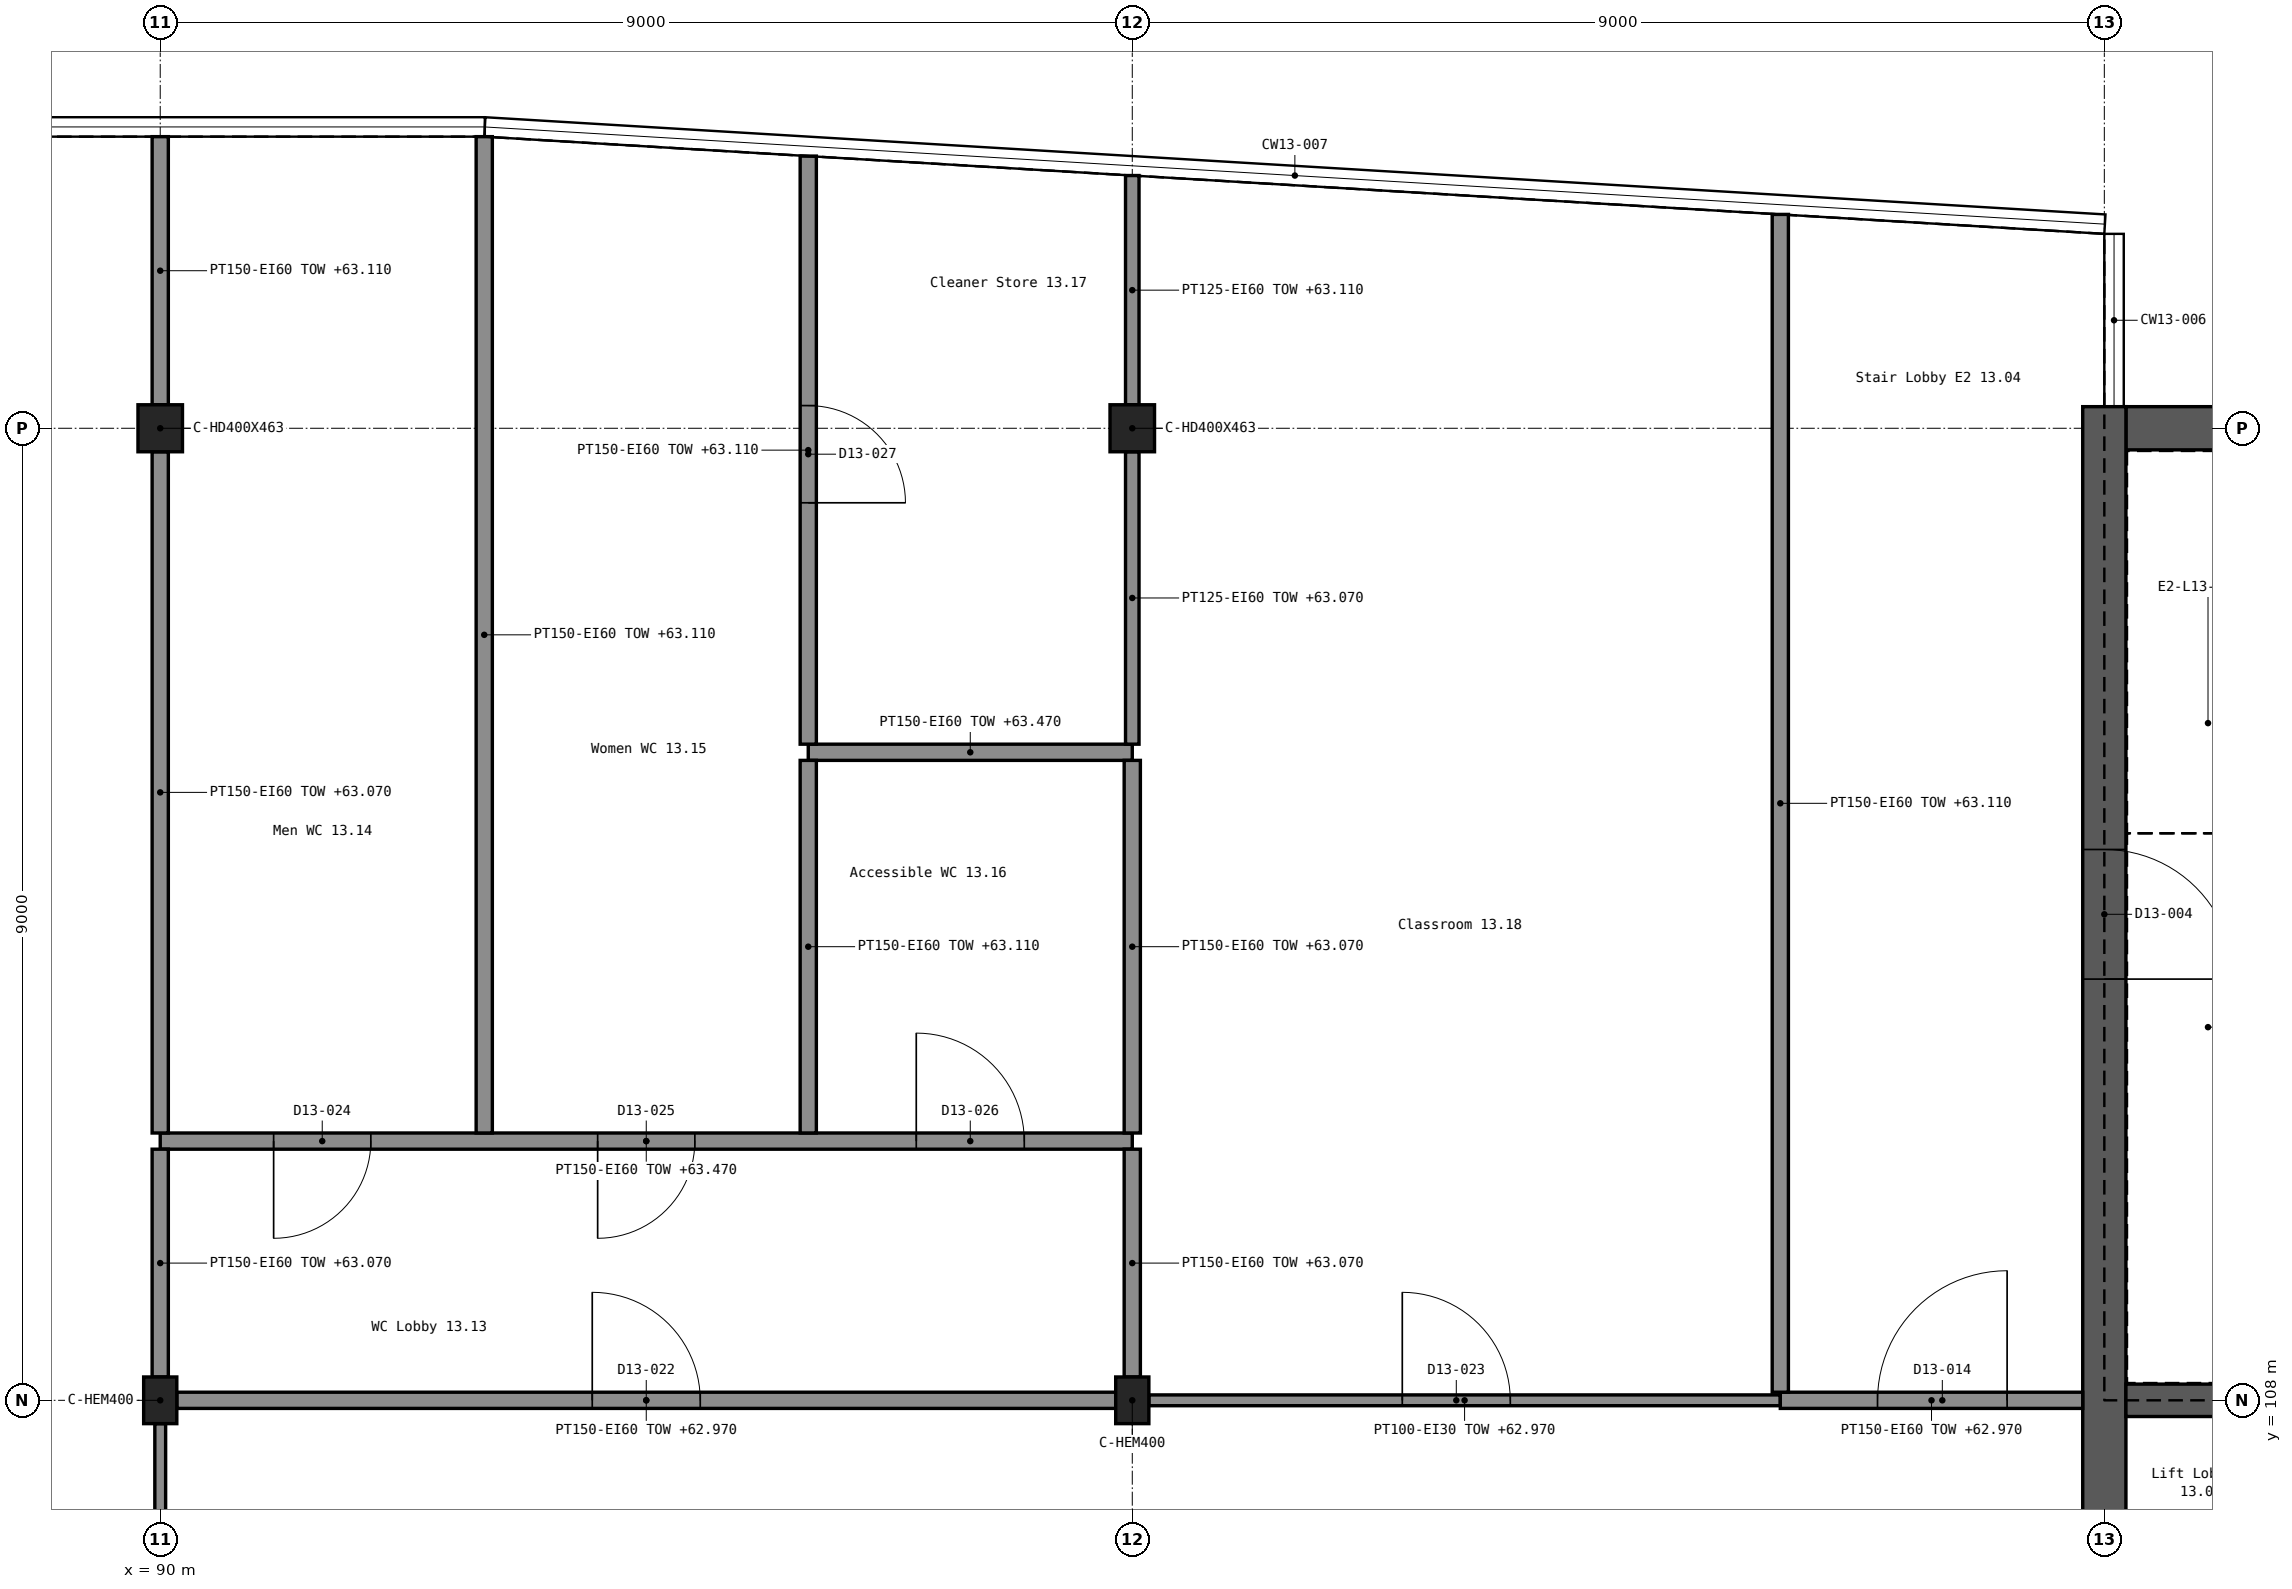
"""IFC4 building model, lengths in metres.
Left out: names, types, materials, properties, quantities, classifications, styles, units other than length and angle.
Written with IfcOpenShell. Run it as: python <this file> out.ifc"""

import sys

from ifc_helpers import new_model, si_unit, direction, frame, frame_2d, origin, origin_2d, place, context, subcontext, project, spatial, rectangle, i_section, extrude, element, fill, save


model = new_model("IFC4")
c1 = context("Model", 3, precision=1e-05, world=origin(), true_north=direction((0.0, 1.0)))
c2 = subcontext(c1, "Body", "Model", "MODEL_VIEW")
j1 = project(units=[si_unit("LENGTHUNIT", "METRE"), si_unit("PLANEANGLEUNIT", "RADIAN")], contexts=[c1])
p1 = place(None, origin())
s1 = spatial("IfcSite", under=j1, at=p1, CompositionType="ELEMENT")
p2 = place(p1, origin())
s2 = spatial("IfcBuilding", under=s1, at=p2, CompositionType="ELEMENT")
p3 = place(p2, frame((0.0, 0.0, 59.7)))
s3 = spatial("IfcBuildingStorey", under=s2, at=p3, CompositionType="ELEMENT", Elevation=59.7)
p4 = place(p3, frame((108.2, 117.0, 0.0), z_axis=(0.0, 0.0, 1.0), x_axis=(1.0, 0.0, 0.0)))
e1 = element("IfcWall", 1, at=p4, inside=s3, PredefinedType="SHEAR", context=c2, shape_type="SweptSolid", body=[
    extrude(rectangle(XDim=8.6, YDim=0.4, at=frame_2d((4.3, 0.0))), origin(), (0.0, 0.0, 1.0), 3.9),
])
p5 = place(p4, frame((4.05, 0.0, 1.2)))
e2 = element("IfcOpeningElement", 2, at=p5, cuts=e1, PredefinedType="OPENING", context=c2, shape_type="SweptSolid", body=[
    extrude(rectangle(XDim=0.9, YDim=1.5, at=frame_2d((0.45, 0.75))), frame((0.0, 0.211, 0.0), z_axis=(0.0, -1.0, 0.0), x_axis=(1.0, 0.0, 0.0)), (0.0, 0.0, 1.0), 0.422),
])
p6 = place(p3, frame((108.0, 89.8, 0.0), z_axis=(0.0, 0.0, 1.0), x_axis=(0.0, 1.0, 0.0)))
e3 = element("IfcWall", 3, at=p6, inside=s3, PredefinedType="SHEAR", context=c2, shape_type="SweptSolid", body=[
    extrude(rectangle(XDim=27.4, YDim=0.4, at=frame_2d((13.7, 0.0))), origin(), (0.0, 0.0, 1.0), 3.9),
])
p7 = place(p6, frame((4.1, 0.0, 0.0)))
e4 = element("IfcOpeningElement", 4, at=p7, cuts=e3, PredefinedType="OPENING", context=c2, shape_type="SweptSolid", body=[
    extrude(rectangle(XDim=1.2, YDim=2.1, at=frame_2d((0.6, 1.05))), frame((0.0, 0.211, 0.0), z_axis=(0.0, -1.0, 0.0), x_axis=(1.0, 0.0, 0.0)), (0.0, 0.0, 1.0), 0.422),
])
p8 = place(p6, frame((22.1, 0.0, 0.0)))
e5 = element("IfcOpeningElement", 5, at=p8, cuts=e3, PredefinedType="OPENING", context=c2, shape_type="SweptSolid", body=[
    extrude(rectangle(XDim=1.2, YDim=2.1, at=frame_2d((0.6, 1.05))), frame((0.0, 0.211, 0.0), z_axis=(0.0, -1.0, 0.0), x_axis=(1.0, 0.0, 0.0)), (0.0, 0.0, 1.0), 0.422),
])
p9 = place(p6, frame((12.5, 0.0, 0.0)))
e6 = element("IfcOpeningElement", 6, at=p9, cuts=e3, PredefinedType="OPENING", context=c2, shape_type="SweptSolid", body=[
    extrude(rectangle(XDim=2.0, YDim=2.1, at=frame_2d((1.0, 1.05))), frame((0.0, 0.211, 0.0), z_axis=(0.0, -1.0, 0.0), x_axis=(1.0, 0.0, 0.0)), (0.0, 0.0, 1.0), 0.422),
])
p10 = place(p3, frame((108.2, 108.0, 0.0), z_axis=(0.0, 0.0, 1.0), x_axis=(1.0, 0.0, 0.0)))
e7 = element("IfcWall", 7, at=p10, inside=s3, PredefinedType="SHEAR", context=c2, shape_type="SweptSolid", body=[
    extrude(rectangle(XDim=8.6, YDim=0.3, at=frame_2d((4.3, 0.0))), origin(), (0.0, 0.0, 1.0), 3.9),
])
for number, where, z_axis, x_axis in (
    (8, (90.0, 108.0, 0.0), (0.0, 0.0, 1.0), (1.0, 0.0, 0.0)),
    (9, (99.0, 108.0, 0.0), (0.0, 0.0, 1.0), (1.0, 0.0, 0.0)),
):
    element("IfcColumn", number, at=place(p3, frame(where, z_axis=z_axis, x_axis=x_axis)), inside=s3, PredefinedType="COLUMN", context=c2, shape_type="SweptSolid", body=[
        extrude(i_section(OverallWidth=0.307, OverallDepth=0.432, WebThickness=0.021, FlangeThickness=0.04, FilletRadius=0.027, at=origin_2d()), origin(), (0.0, 0.0, 1.0), 3.9),
    ])
for number, where, z_axis, x_axis in (
    (10, (90.0, 117.0, 0.0), (0.0, 0.0, 1.0), (1.0, 0.0, 0.0)),
    (11, (99.0, 117.0, 0.0), (0.0, 0.0, 1.0), (1.0, 0.0, 0.0)),
):
    element("IfcColumn", number, at=place(p3, frame(where, z_axis=z_axis, x_axis=x_axis)), inside=s3, PredefinedType="COLUMN", context=c2, shape_type="SweptSolid", body=[
        extrude(i_section(OverallWidth=0.412, OverallDepth=0.435, WebThickness=0.036, FlangeThickness=0.057, FilletRadius=0.015, at=origin_2d()), origin(), (0.0, 0.0, 1.0), 3.9),
    ])
p11 = place(p3, frame((99.154, 108.0, 0.0), z_axis=(0.0, 0.0, 1.0), x_axis=(1.0, 0.0, 0.0)))
e12 = element("IfcWall", 12, at=p11, inside=s3, PredefinedType="PARTITIONING", context=c2, shape_type="SweptSolid", body=[
    extrude(rectangle(XDim=5.846, YDim=0.1, at=frame_2d((2.923, 0.0))), origin(), (0.0, 0.0, 1.0), 3.27),
])
p12 = place(p11, frame((2.346, 0.0, 0.0)))
e13 = element("IfcOpeningElement", 13, at=p12, cuts=e12, PredefinedType="OPENING", context=c2, shape_type="SweptSolid", body=[
    extrude(rectangle(XDim=1.0, YDim=2.1, at=frame_2d((0.5, 1.05))), frame((0.0, 0.061, 0.0), z_axis=(0.0, -1.0, 0.0), x_axis=(1.0, 0.0, 0.0)), (0.0, 0.0, 1.0), 0.122),
])
p13 = place(p3, frame((90.154, 108.0, 0.0), z_axis=(0.0, 0.0, 1.0), x_axis=(1.0, 0.0, 0.0)))
e14 = element("IfcWall", 14, at=p13, inside=s3, PredefinedType="PARTITIONING", context=c2, shape_type="SweptSolid", body=[
    extrude(rectangle(XDim=8.693, YDim=0.15, at=frame_2d((4.346, 0.0))), origin(), (0.0, 0.0, 1.0), 3.27),
])
p14 = place(p13, frame((3.846, 0.0, 0.0)))
e15 = element("IfcOpeningElement", 15, at=p14, cuts=e14, PredefinedType="OPENING", context=c2, shape_type="SweptSolid", body=[
    extrude(rectangle(XDim=1.0, YDim=2.1, at=frame_2d((0.5, 1.05))), frame((0.0, 0.086, 0.0), z_axis=(0.0, -1.0, 0.0), x_axis=(1.0, 0.0, 0.0)), (0.0, 0.0, 1.0), 0.172),
])
p15 = place(p3, frame((105.0, 108.0, 0.0), z_axis=(0.0, 0.0, 1.0), x_axis=(1.0, 0.0, 0.0)))
e16 = element("IfcWall", 16, at=p15, inside=s3, PredefinedType="PARTITIONING", context=c2, shape_type="SweptSolid", body=[
    extrude(rectangle(XDim=2.8, YDim=0.15, at=frame_2d((1.4, 0.0))), origin(), (0.0, 0.0, 1.0), 3.27),
])
p16 = place(p15, frame((0.9, 0.0, 0.0)))
e17 = element("IfcOpeningElement", 17, at=p16, cuts=e16, PredefinedType="OPENING", context=c2, shape_type="SweptSolid", body=[
    extrude(rectangle(XDim=1.2, YDim=2.1, at=frame_2d((0.6, 1.05))), frame((0.0, 0.086, 0.0), z_axis=(0.0, -1.0, 0.0), x_axis=(1.0, 0.0, 0.0)), (0.0, 0.0, 1.0), 0.172),
])
p17 = place(p3, frame((90.0, 110.4, 0.0), z_axis=(0.0, 0.0, 1.0), x_axis=(1.0, 0.0, 0.0)))
e18 = element("IfcWall", 18, at=p17, inside=s3, PredefinedType="PARTITIONING", context=c2, shape_type="SweptSolid", body=[
    extrude(rectangle(XDim=9.0, YDim=0.15, at=frame_2d((4.5, 0.0))), origin(), (0.0, 0.0, 1.0), 3.77),
])
p18 = place(p17, frame((1.05, 0.0, 0.0)))
e19 = element("IfcOpeningElement", 19, at=p18, cuts=e18, PredefinedType="OPENING", context=c2, shape_type="SweptSolid", body=[
    extrude(rectangle(XDim=0.9, YDim=2.1, at=frame_2d((0.45, 1.05))), frame((0.0, 0.086, 0.0), z_axis=(0.0, -1.0, 0.0), x_axis=(1.0, 0.0, 0.0)), (0.0, 0.0, 1.0), 0.172),
])
p19 = place(p17, frame((4.05, 0.0, 0.0)))
e20 = element("IfcOpeningElement", 20, at=p19, cuts=e18, PredefinedType="OPENING", context=c2, shape_type="SweptSolid", body=[
    extrude(rectangle(XDim=0.9, YDim=2.1, at=frame_2d((0.45, 1.05))), frame((0.0, 0.086, 0.0), z_axis=(0.0, -1.0, 0.0), x_axis=(1.0, 0.0, 0.0)), (0.0, 0.0, 1.0), 0.172),
])
p20 = place(p17, frame((7.0, 0.0, 0.0)))
e21 = element("IfcOpeningElement", 21, at=p20, cuts=e18, PredefinedType="OPENING", context=c2, shape_type="SweptSolid", body=[
    extrude(rectangle(XDim=1.0, YDim=2.1, at=frame_2d((0.5, 1.05))), frame((0.0, 0.086, 0.0), z_axis=(0.0, -1.0, 0.0), x_axis=(1.0, 0.0, 0.0)), (0.0, 0.0, 1.0), 0.172),
])
p21 = place(p3, frame((96.0, 114.0, 0.0), z_axis=(0.0, 0.0, 1.0), x_axis=(1.0, 0.0, 0.0)))
e22 = element("IfcWall", 22, at=p21, inside=s3, PredefinedType="PARTITIONING", context=c2, shape_type="SweptSolid", body=[
    extrude(rectangle(XDim=3.0, YDim=0.15, at=frame_2d((1.5, 0.0))), origin(), (0.0, 0.0, 1.0), 3.77),
])
p22 = place(p3, frame((90.0, 99.216, 0.0), z_axis=(0.0, 0.0, 1.0), x_axis=(0.0, 1.0, 0.0)))
e23 = element("IfcWall", 23, at=p22, inside=s3, PredefinedType="PARTITIONING", context=c2, shape_type="SweptSolid", body=[
    extrude(rectangle(XDim=8.568, YDim=0.1, at=frame_2d((4.284, 0.0))), origin(), (0.0, 0.0, 1.0), 3.37),
])
p23 = place(p22, frame((5.759, 0.0, 0.0)))
e24 = element("IfcOpeningElement", 24, at=p23, cuts=e23, PredefinedType="OPENING", context=c2, shape_type="SweptSolid", body=[
    extrude(rectangle(XDim=1.8, YDim=2.4, at=frame_2d((0.9, 1.2))), frame((0.0, 0.061, 0.0), z_axis=(0.0, -1.0, 0.0), x_axis=(1.0, 0.0, 0.0)), (0.0, 0.0, 1.0), 0.122),
])
p24 = place(p3, frame((90.0, 108.216, 0.0), z_axis=(0.0, 0.0, 1.0), x_axis=(0.0, 1.0, 0.0)))
e25 = element("IfcWall", 25, at=p24, inside=s3, PredefinedType="PARTITIONING", context=c2, shape_type="SweptSolid", body=[
    extrude(rectangle(XDim=2.109, YDim=0.15, at=frame_2d((1.054, 0.0))), origin(), (0.0, 0.0, 1.0), 3.37),
])
p25 = place(p3, frame((90.0, 110.475, 0.0), z_axis=(0.0, 0.0, 1.0), x_axis=(0.0, 1.0, 0.0)))
e26 = element("IfcWall", 26, at=p25, inside=s3, PredefinedType="PARTITIONING", context=c2, shape_type="SweptSolid", body=[
    extrude(rectangle(XDim=6.307, YDim=0.15, at=frame_2d((3.154, 0.0))), origin(), (0.0, 0.0, 1.0), 3.37),
])
p26 = place(p3, frame((90.0, 117.218, 0.0), z_axis=(0.0, 0.0, 1.0), x_axis=(0.0, 1.0, 0.0)))
e27 = element("IfcWall", 27, at=p26, inside=s3, PredefinedType="PARTITIONING", context=c2, shape_type="SweptSolid", body=[
    extrude(rectangle(XDim=2.482, YDim=0.15, at=frame_2d((1.241, 0.0))), origin(), (0.0, 0.0, 1.0), 3.41),
])
p27 = place(p3, frame((93.0, 110.475, 0.0), z_axis=(0.0, 0.0, 1.0), x_axis=(0.0, 1.0, 0.0)))
e28 = element("IfcWall", 28, at=p27, inside=s3, PredefinedType="PARTITIONING", context=c2, shape_type="SweptSolid", body=[
    extrude(rectangle(XDim=9.225, YDim=0.15, at=frame_2d((4.612, 0.0))), origin(), (0.0, 0.0, 1.0), 3.41),
])
p28 = place(p3, frame((96.0, 110.475, 0.0), z_axis=(0.0, 0.0, 1.0), x_axis=(0.0, 1.0, 0.0)))
e29 = element("IfcWall", 29, at=p28, inside=s3, PredefinedType="PARTITIONING", context=c2, shape_type="SweptSolid", body=[
    extrude(rectangle(XDim=3.45, YDim=0.15, at=frame_2d((1.725, 0.0))), origin(), (0.0, 0.0, 1.0), 3.41),
])
p29 = place(p3, frame((96.0, 114.075, 0.0), z_axis=(0.0, 0.0, 1.0), x_axis=(0.0, 1.0, 0.0)))
e30 = element("IfcWall", 30, at=p29, inside=s3, PredefinedType="PARTITIONING", context=c2, shape_type="SweptSolid", body=[
    extrude(rectangle(XDim=5.445, YDim=0.15, at=frame_2d((2.723, 0.0))), origin(), (0.0, 0.0, 1.0), 3.41),
])
p30 = place(p29, frame((2.235, 0.0, 0.0)))
e31 = element("IfcOpeningElement", 31, at=p30, cuts=e30, PredefinedType="OPENING", context=c2, shape_type="SweptSolid", body=[
    extrude(rectangle(XDim=0.9, YDim=2.1, at=frame_2d((0.45, 1.05))), frame((0.0, 0.086, 0.0), z_axis=(0.0, -1.0, 0.0), x_axis=(1.0, 0.0, 0.0)), (0.0, 0.0, 1.0), 0.172),
])
p31 = place(p3, frame((99.0, 114.075, 0.0), z_axis=(0.0, 0.0, 1.0), x_axis=(0.0, 1.0, 0.0)))
e32 = element("IfcWall", 32, at=p31, inside=s3, PredefinedType="PARTITIONING", context=c2, shape_type="SweptSolid", body=[
    extrude(rectangle(XDim=2.708, YDim=0.125, at=frame_2d((1.354, 0.0))), origin(), (0.0, 0.0, 1.0), 3.37),
])
p32 = place(p3, frame((99.0, 117.218, 0.0), z_axis=(0.0, 0.0, 1.0), x_axis=(0.0, 1.0, 0.0)))
e33 = element("IfcWall", 33, at=p32, inside=s3, PredefinedType="PARTITIONING", context=c2, shape_type="SweptSolid", body=[
    extrude(rectangle(XDim=2.123, YDim=0.125, at=frame_2d((1.061, 0.0))), origin(), (0.0, 0.0, 1.0), 3.41),
])
p33 = place(p3, frame((99.0, 108.216, 0.0), z_axis=(0.0, 0.0, 1.0), x_axis=(0.0, 1.0, 0.0)))
e34 = element("IfcWall", 34, at=p33, inside=s3, PredefinedType="PARTITIONING", context=c2, shape_type="SweptSolid", body=[
    extrude(rectangle(XDim=2.109, YDim=0.15, at=frame_2d((1.054, 0.0))), origin(), (0.0, 0.0, 1.0), 3.37),
])
p34 = place(p3, frame((99.0, 110.475, 0.0), z_axis=(0.0, 0.0, 1.0), x_axis=(0.0, 1.0, 0.0)))
e35 = element("IfcWall", 35, at=p34, inside=s3, PredefinedType="PARTITIONING", context=c2, shape_type="SweptSolid", body=[
    extrude(rectangle(XDim=3.45, YDim=0.15, at=frame_2d((1.725, 0.0))), origin(), (0.0, 0.0, 1.0), 3.37),
])
p35 = place(p3, frame((105.0, 108.075, 0.0), z_axis=(0.0, 0.0, 1.0), x_axis=(0.0, 1.0, 0.0)))
e36 = element("IfcWall", 36, at=p35, inside=s3, PredefinedType="PARTITIONING", context=c2, shape_type="SweptSolid", body=[
    extrude(rectangle(XDim=10.905, YDim=0.15, at=frame_2d((5.453, 0.0))), origin(), (0.0, 0.0, 1.0), 3.41),
])
p36 = place(p8, frame((1.2, 0.0, 0.0), z_axis=(0.0, 0.0, 1.0), x_axis=(-1.0, 0.0, 0.0)))
e37 = element("IfcDoor", 37, at=p36, inside=s3, OperationType="SINGLE_SWING_RIGHT", PredefinedType="DOOR", context=c2, shape_type="SweptSolid", body=[
    extrude(rectangle(XDim=1.2, YDim=2.1, at=frame_2d((0.6, 1.05))), frame((0.0, 0.025, 0.0), z_axis=(0.0, -1.0, 0.0), x_axis=(1.0, 0.0, 0.0)), (0.0, 0.0, 1.0), 0.05),
])
fill(e5, e37)
p37 = place(p16, origin())
e38 = element("IfcDoor", 38, at=p37, inside=s3, OperationType="SINGLE_SWING_RIGHT", PredefinedType="DOOR", context=c2, shape_type="SweptSolid", body=[
    extrude(rectangle(XDim=1.2, YDim=2.1, at=frame_2d((0.6, 1.05))), frame((0.0, 0.025, 0.0), z_axis=(0.0, -1.0, 0.0), x_axis=(1.0, 0.0, 0.0)), (0.0, 0.0, 1.0), 0.05),
])
fill(e17, e38)
p38 = place(p14, origin())
e39 = element("IfcDoor", 39, at=p38, inside=s3, OperationType="SINGLE_SWING_LEFT", PredefinedType="DOOR", context=c2, shape_type="SweptSolid", body=[
    extrude(rectangle(XDim=1.0, YDim=2.1, at=frame_2d((0.5, 1.05))), frame((0.0, 0.025, 0.0), z_axis=(0.0, -1.0, 0.0), x_axis=(1.0, 0.0, 0.0)), (0.0, 0.0, 1.0), 0.05),
])
fill(e15, e39)
p39 = place(p12, origin())
e40 = element("IfcDoor", 40, at=p39, inside=s3, OperationType="SINGLE_SWING_LEFT", PredefinedType="DOOR", context=c2, shape_type="SweptSolid", body=[
    extrude(rectangle(XDim=1.0, YDim=2.1, at=frame_2d((0.5, 1.05))), frame((0.0, 0.025, 0.0), z_axis=(0.0, -1.0, 0.0), x_axis=(1.0, 0.0, 0.0)), (0.0, 0.0, 1.0), 0.05),
])
fill(e13, e40)
p40 = place(p18, frame((0.9, 0.0, 0.0), z_axis=(0.0, 0.0, 1.0), x_axis=(-1.0, 0.0, 0.0)))
e41 = element("IfcDoor", 41, at=p40, inside=s3, OperationType="SINGLE_SWING_RIGHT", PredefinedType="DOOR", context=c2, shape_type="SweptSolid", body=[
    extrude(rectangle(XDim=0.9, YDim=2.1, at=frame_2d((0.45, 1.05))), frame((0.0, 0.025, 0.0), z_axis=(0.0, -1.0, 0.0), x_axis=(1.0, 0.0, 0.0)), (0.0, 0.0, 1.0), 0.05),
])
fill(e19, e41)
p41 = place(p19, frame((0.9, 0.0, 0.0), z_axis=(0.0, 0.0, 1.0), x_axis=(-1.0, 0.0, 0.0)))
e42 = element("IfcDoor", 42, at=p41, inside=s3, OperationType="SINGLE_SWING_RIGHT", PredefinedType="DOOR", context=c2, shape_type="SweptSolid", body=[
    extrude(rectangle(XDim=0.9, YDim=2.1, at=frame_2d((0.45, 1.05))), frame((0.0, 0.025, 0.0), z_axis=(0.0, -1.0, 0.0), x_axis=(1.0, 0.0, 0.0)), (0.0, 0.0, 1.0), 0.05),
])
fill(e20, e42)
p42 = place(p20, origin())
e43 = element("IfcDoor", 43, at=p42, inside=s3, OperationType="SINGLE_SWING_LEFT", PredefinedType="DOOR", context=c2, shape_type="SweptSolid", body=[
    extrude(rectangle(XDim=1.0, YDim=2.1, at=frame_2d((0.5, 1.05))), frame((0.0, 0.025, 0.0), z_axis=(0.0, -1.0, 0.0), x_axis=(1.0, 0.0, 0.0)), (0.0, 0.0, 1.0), 0.05),
])
fill(e21, e43)
p43 = place(p30, frame((0.9, 0.0, 0.0), z_axis=(0.0, 0.0, 1.0), x_axis=(-1.0, 0.0, 0.0)))
e44 = element("IfcDoor", 44, at=p43, inside=s3, OperationType="SINGLE_SWING_RIGHT", PredefinedType="DOOR", context=c2, shape_type="SweptSolid", body=[
    extrude(rectangle(XDim=0.9, YDim=2.1, at=frame_2d((0.45, 1.05))), frame((0.0, 0.025, 0.0), z_axis=(0.0, -1.0, 0.0), x_axis=(1.0, 0.0, 0.0)), (0.0, 0.0, 1.0), 0.05),
])
fill(e31, e44)
save(model, sys.argv[1])
